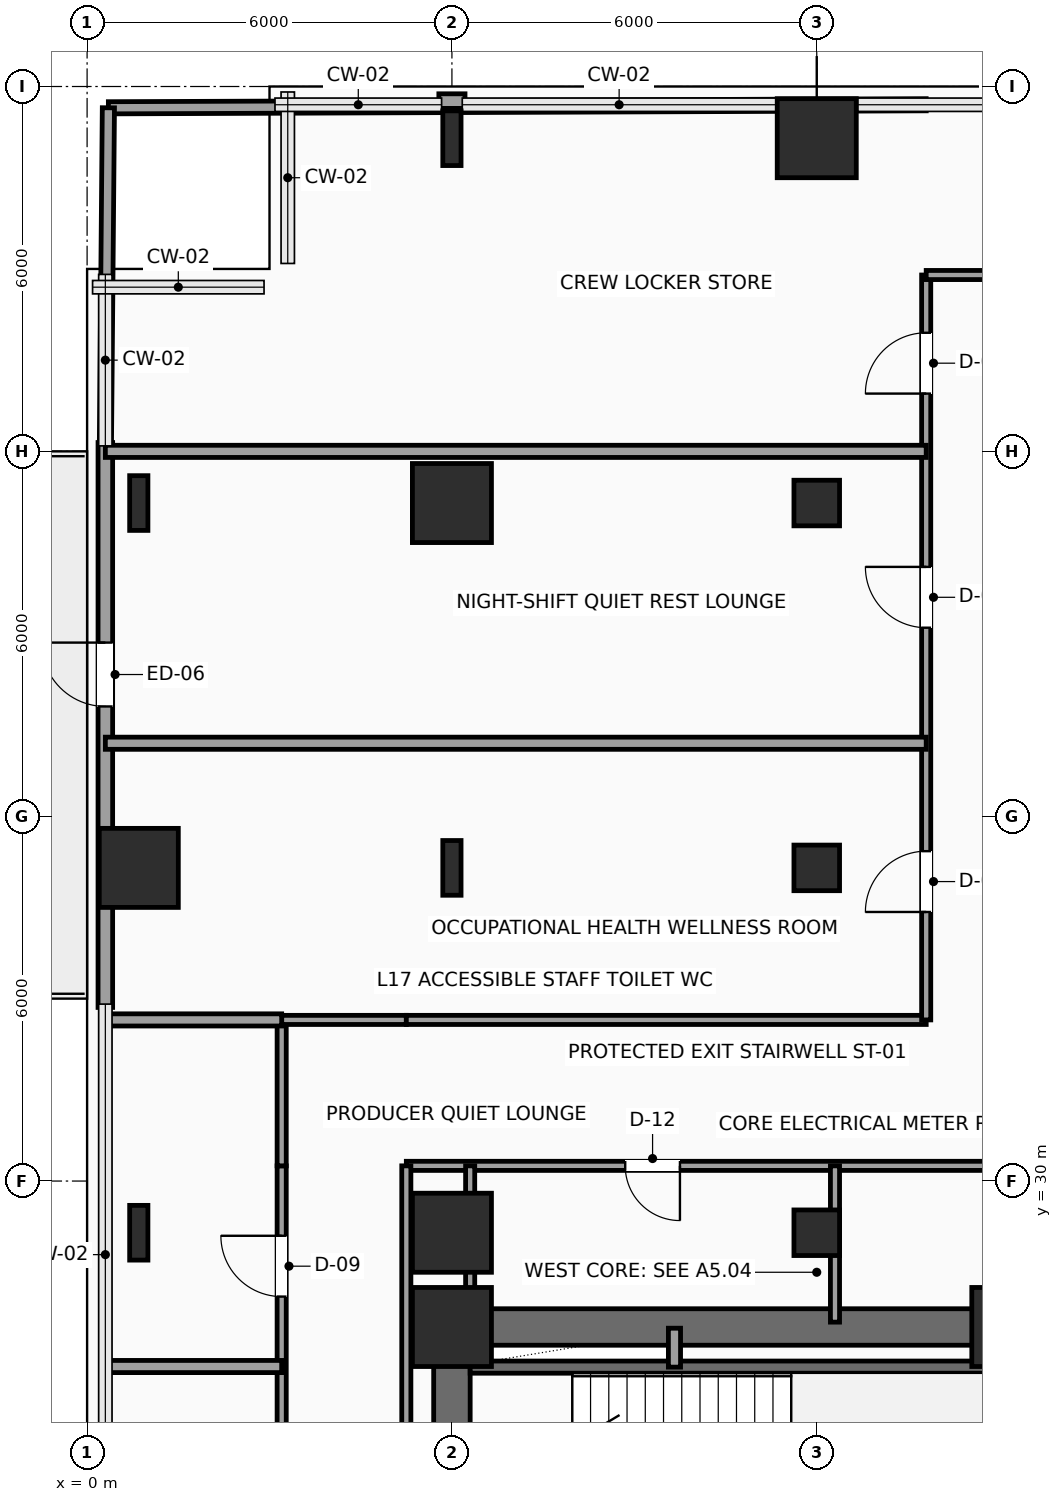
"""IFC4 building model, lengths in metres.
Left out: names, types, materials, properties, quantities, classifications, styles, units other than length and angle.
Written with IfcOpenShell. Run it as: python <this file> out.ifc"""

import sys

from ifc_helpers import new_model, si_unit, direction, frame, frame_2d, origin, origin_2d, place, context, subcontext, project, spatial, rectangle, hollow_rectangle, i_section, extrude, element, fill, save


model = new_model("IFC4")
c1 = context("Model", 3, precision=1e-05, world=origin(), true_north=direction((0.0, 1.0)))
c2 = subcontext(c1, "Body", "Model", "MODEL_VIEW")
j1 = project(units=[si_unit("LENGTHUNIT", "METRE"), si_unit("PLANEANGLEUNIT", "RADIAN")], contexts=[c1])
p1 = place(None, origin())
s1 = spatial("IfcSite", under=j1, at=p1, CompositionType="ELEMENT")
p2 = place(p1, origin())
s2 = spatial("IfcBuilding", under=s1, at=p2, CompositionType="ELEMENT")
p3 = place(p2, frame((0.0, 0.0, 75.3)))
s3 = spatial("IfcBuildingStorey", under=s2, at=p3, CompositionType="ELEMENT", Elevation=75.3)
for number, where, z_axis, x_axis in (
    (1, (6.0, 27.6, 0.0), (0.0, 0.0, 1.0), (1.0, 0.0, 0.0)),
    (2, (15.2, 27.6, 0.0), (0.0, 0.0, 1.0), (1.0, 0.0, 0.0)),
):
    element("IfcColumn", number, at=place(p3, frame(where, z_axis=z_axis, x_axis=x_axis)), inside=s3, PredefinedType="COLUMN", context=c2, shape_type="SweptSolid", body=[
        extrude(rectangle(XDim=1.3, YDim=1.3, at=origin_2d()), origin(), (0.0, 0.0, 1.0), 3.9),
    ])
p4 = place(p3, frame((0.85, 29.15, 0.0), z_axis=(0.0, 0.0, 1.0), x_axis=(1.0, 0.0, 0.0)))
e3 = element("IfcColumn", 3, at=p4, inside=s3, PredefinedType="COLUMN", context=c2, shape_type="SweptSolid", body=[
    extrude(i_section(OverallWidth=0.3, OverallDepth=0.9, WebThickness=0.019, FlangeThickness=0.035, FilletRadius=0.03, at=origin_2d()), origin(), (0.0, 0.0, 1.0), 3.9),
])
p5 = place(p3, frame((0.85, 35.15, 0.0), z_axis=(0.0, 0.0, 1.0), x_axis=(1.0, 0.0, 0.0)))
e4 = element("IfcColumn", 4, at=p5, inside=s3, PredefinedType="COLUMN", context=c2, shape_type="SweptSolid", body=[
    extrude(rectangle(XDim=1.3, YDim=1.3, at=origin_2d()), origin(), (0.0, 0.0, 1.0), 3.9),
])
p6 = place(p3, frame((0.85, 41.15, 0.0), z_axis=(0.0, 0.0, 1.0), x_axis=(1.0, 0.0, 0.0)))
e5 = element("IfcColumn", 5, at=p6, inside=s3, PredefinedType="COLUMN", context=c2, shape_type="SweptSolid", body=[
    extrude(i_section(OverallWidth=0.3, OverallDepth=0.9, WebThickness=0.019, FlangeThickness=0.035, FilletRadius=0.03, at=origin_2d()), origin(), (0.0, 0.0, 1.0), 3.9),
])
p7 = place(p3, frame((6.0, 29.15, 0.0), z_axis=(0.0, 0.0, 1.0), x_axis=(1.0, 0.0, 0.0)))
e6 = element("IfcColumn", 6, at=p7, inside=s3, PredefinedType="COLUMN", context=c2, shape_type="SweptSolid", body=[
    extrude(rectangle(XDim=1.3, YDim=1.3, at=origin_2d()), origin(), (0.0, 0.0, 1.0), 3.9),
])
p8 = place(p3, frame((6.0, 35.15, 0.0), z_axis=(0.0, 0.0, 1.0), x_axis=(1.0, 0.0, 0.0)))
e7 = element("IfcColumn", 7, at=p8, inside=s3, PredefinedType="COLUMN", context=c2, shape_type="SweptSolid", body=[
    extrude(i_section(OverallWidth=0.3, OverallDepth=0.9, WebThickness=0.019, FlangeThickness=0.035, FilletRadius=0.03, at=origin_2d()), origin(), (0.0, 0.0, 1.0), 3.9),
])
p9 = place(p3, frame((6.0, 41.15, 0.0), z_axis=(0.0, 0.0, 1.0), x_axis=(1.0, 0.0, 0.0)))
e8 = element("IfcColumn", 8, at=p9, inside=s3, PredefinedType="COLUMN", context=c2, shape_type="SweptSolid", body=[
    extrude(rectangle(XDim=1.3, YDim=1.3, at=origin_2d()), origin(), (0.0, 0.0, 1.0), 3.9),
])
p10 = place(p3, frame((6.0, 47.15, 0.0), z_axis=(0.0, 0.0, 1.0), x_axis=(1.0, 0.0, 0.0)))
e9 = element("IfcColumn", 9, at=p10, inside=s3, PredefinedType="COLUMN", context=c2, shape_type="SweptSolid", body=[
    extrude(i_section(OverallWidth=0.3, OverallDepth=0.9, WebThickness=0.019, FlangeThickness=0.035, FilletRadius=0.03, at=origin_2d()), origin(), (0.0, 0.0, 1.0), 3.9),
])
for number, where, z_axis, x_axis in (
    (10, (12.0, 29.15, 0.0), (0.0, 0.0, 1.0), (1.0, 0.0, 0.0)),
    (11, (12.0, 35.15, 0.0), (0.0, 0.0, 1.0), (1.0, 0.0, 0.0)),
    (12, (12.0, 41.15, 0.0), (0.0, 0.0, 1.0), (1.0, 0.0, 0.0)),
):
    element("IfcColumn", number, at=place(p3, frame(where, z_axis=z_axis, x_axis=x_axis)), inside=s3, PredefinedType="COLUMN", context=c2, shape_type="SweptSolid", body=[
        extrude(hollow_rectangle(XDim=0.75, YDim=0.75, WallThickness=0.035, InnerFilletRadius=0.035, OuterFilletRadius=0.05, at=origin_2d()), origin(), (0.0, 0.0, 1.0), 3.9),
    ])
p11 = place(p3, frame((12.0, 47.15, 0.0), z_axis=(0.0, 0.0, 1.0), x_axis=(1.0, 0.0, 0.0)))
e13 = element("IfcColumn", 13, at=p11, inside=s3, PredefinedType="COLUMN", context=c2, shape_type="SweptSolid", body=[
    extrude(rectangle(XDim=1.3, YDim=1.3, at=origin_2d()), origin(), (0.0, 0.0, 1.0), 3.9),
])
p12 = place(p3, frame((0.3, 32.855, 0.0), z_axis=(0.0, 0.0, 1.0), x_axis=(0.0, 1.0, 0.0)))
e14 = element("IfcWall", 14, at=p12, inside=s3, PredefinedType="SOLIDWALL", context=c2, shape_type="SweptSolid", body=[
    extrude(rectangle(XDim=9.29, YDim=0.24, at=frame_2d((4.645, 0.0))), origin(), (0.0, 0.0, 1.0), 3.65),
])
p13 = place(p12, frame((4.95, 0.0, 0.0)))
e15 = element("IfcOpeningElement", 15, at=p13, cuts=e14, PredefinedType="OPENING", context=c2, shape_type="SweptSolid", body=[
    extrude(rectangle(XDim=1.05, YDim=2.2, at=frame_2d((0.525, 1.1))), frame((0.0, 0.13, 0.0), z_axis=(0.0, -1.0, 0.0), x_axis=(1.0, 0.0, 0.0)), (0.0, 0.0, 1.0), 0.26),
])
p14 = place(p3, frame((5.785, 47.76, 0.0), z_axis=(0.0, 0.0, 1.0), x_axis=(1.0, 0.0, 0.0)))
e16 = element("IfcWall", 16, at=p14, inside=s3, PredefinedType="SOLIDWALL", context=c2, shape_type="SweptSolid", body=[
    extrude(rectangle(XDim=0.43, YDim=0.24, at=frame_2d((0.215, 0.0))), origin(), (0.0, 0.0, 1.0), 3.65),
])
p15 = place(p3, frame((6.0, 27.6, 0.0), z_axis=(0.0, 0.0, 1.0), x_axis=(1.0, 0.0, 0.0)))
e17 = element("IfcWall", 17, at=p15, inside=s3, PredefinedType="SHEAR", context=c2, shape_type="SweptSolid", body=[
    extrude(rectangle(XDim=12.0, YDim=0.6, at=frame_2d((6.0, 0.0))), origin(), (0.0, 0.0, 1.0), 3.65),
])
p16 = place(p15, frame((10.2, 0.0, 0.0)))
e18 = element("IfcOpeningElement", 18, at=p16, cuts=e17, PredefinedType="OPENING", context=c2, shape_type="SweptSolid", body=[
    extrude(rectangle(XDim=0.9, YDim=2.15, at=frame_2d((0.45, 1.075))), frame((0.0, 0.31, 0.0), z_axis=(0.0, -1.0, 0.0), x_axis=(1.0, 0.0, 0.0)), (0.0, 0.0, 1.0), 0.62),
])
p17 = place(p3, frame((6.0, 18.0, 0.0), z_axis=(0.0, 0.0, 1.0), x_axis=(0.0, 1.0, 0.0)))
e19 = element("IfcWall", 19, at=p17, inside=s3, PredefinedType="SHEAR", context=c2, shape_type="SweptSolid", body=[
    extrude(rectangle(XDim=9.6, YDim=0.6, at=frame_2d((4.8, 0.0))), origin(), (0.0, 0.0, 1.0), 3.65),
])
p18 = place(p3, frame((6.3, 26.94, 0.0), z_axis=(0.0, 0.0, 1.0), x_axis=(1.0, 0.0, 0.0)))
e20 = element("IfcWall", 20, at=p18, inside=s3, PredefinedType="SHEAR", context=c2, shape_type="SweptSolid", body=[
    extrude(rectangle(XDim=8.88, YDim=0.2, at=frame_2d((4.44, 0.0))), origin(), (0.0, 0.0, 1.0), 3.65),
])
p19 = place(p3, frame((9.66, 26.94, 0.0), z_axis=(0.0, 0.0, 1.0), x_axis=(0.0, 1.0, 0.0)))
e21 = element("IfcWall", 21, at=p19, inside=s3, PredefinedType="SOLIDWALL", context=c2, shape_type="SweptSolid", body=[
    extrude(rectangle(XDim=0.64, YDim=0.2, at=frame_2d((0.32, 0.0))), origin(), (0.0, 0.0, 1.0), 3.65),
])
p20 = place(p3, frame((3.2, 14.55, 0.0), z_axis=(0.0, 0.0, 1.0), x_axis=(0.0, 1.0, 0.0)))
e22 = element("IfcWall", 22, at=p20, inside=s3, PredefinedType="PARTITIONING", context=c2, shape_type="SweptSolid", body=[
    extrude(rectangle(XDim=15.7, YDim=0.15, at=frame_2d((7.85, 0.0))), origin(), (0.0, 0.0, 1.0), 3.65),
])
p21 = place(p20, frame((2.6, 0.0, 0.0)))
e23 = element("IfcOpeningElement", 23, at=p21, cuts=e22, PredefinedType="OPENING", context=c2, shape_type="SweptSolid", body=[
    extrude(rectangle(XDim=1.0, YDim=2.2, at=frame_2d((0.5, 1.1))), frame((0.0, 0.085, 0.0), z_axis=(0.0, -1.0, 0.0), x_axis=(1.0, 0.0, 0.0)), (0.0, 0.0, 1.0), 0.17),
])
p22 = place(p20, frame((8.8, 0.0, 0.0)))
e24 = element("IfcOpeningElement", 24, at=p22, cuts=e22, PredefinedType="OPENING", context=c2, shape_type="SweptSolid", body=[
    extrude(rectangle(XDim=1.0, YDim=2.2, at=frame_2d((0.5, 1.1))), frame((0.0, 0.085, 0.0), z_axis=(0.0, -1.0, 0.0), x_axis=(1.0, 0.0, 0.0)), (0.0, 0.0, 1.0), 0.17),
])
p23 = place(p20, frame((13.55, 0.0, 0.0)))
e25 = element("IfcOpeningElement", 25, at=p23, cuts=e22, PredefinedType="OPENING", context=c2, shape_type="SweptSolid", body=[
    extrude(rectangle(XDim=1.0, YDim=2.2, at=frame_2d((0.5, 1.1))), frame((0.0, 0.085, 0.0), z_axis=(0.0, -1.0, 0.0), x_axis=(1.0, 0.0, 0.0)), (0.0, 0.0, 1.0), 0.17),
])
p24 = place(p3, frame((3.2, 30.25, 0.0), z_axis=(0.0, 0.0, 1.0), x_axis=(0.0, 1.0, 0.0)))
e26 = element("IfcWall", 26, at=p24, inside=s3, PredefinedType="PARTITIONING", context=c2, shape_type="SweptSolid", body=[
    extrude(rectangle(XDim=2.4, YDim=0.15, at=frame_2d((1.2, 0.0))), origin(), (0.0, 0.0, 1.0), 3.65),
])
p25 = place(p3, frame((3.2, 32.65, 0.0), z_axis=(0.0, 0.0, 1.0), x_axis=(1.0, 0.0, 0.0)))
e27 = element("IfcWall", 27, at=p25, inside=s3, PredefinedType="PARTITIONING", context=c2, shape_type="SweptSolid", body=[
    extrude(rectangle(XDim=2.05, YDim=0.15, at=frame_2d((1.025, 0.0))), origin(), (0.0, 0.0, 1.0), 3.65),
])
p26 = place(p3, frame((5.25, 32.65, 0.0), z_axis=(0.0, 0.0, 1.0), x_axis=(1.0, 0.0, 0.0)))
e28 = element("IfcWall", 28, at=p26, inside=s3, PredefinedType="PARTITIONING", context=c2, shape_type="SweptSolid", body=[
    extrude(rectangle(XDim=8.55, YDim=0.15, at=frame_2d((4.275, 0.0))), origin(), (0.0, 0.0, 1.0), 3.65),
])
p27 = place(p3, frame((13.8, 32.65, 0.0), z_axis=(0.0, 0.0, 1.0), x_axis=(0.0, 1.0, 0.0)))
e29 = element("IfcWall", 29, at=p27, inside=s3, PredefinedType="PARTITIONING", context=c2, shape_type="SweptSolid", body=[
    extrude(rectangle(XDim=12.25, YDim=0.15, at=frame_2d((6.125, 0.0))), origin(), (0.0, 0.0, 1.0), 3.65),
])
p28 = place(p27, frame((1.775, 0.0, 0.0)))
e30 = element("IfcOpeningElement", 30, at=p28, cuts=e29, PredefinedType="OPENING", context=c2, shape_type="SweptSolid", body=[
    extrude(rectangle(XDim=1.0, YDim=2.2, at=frame_2d((0.5, 1.1))), frame((0.0, 0.085, 0.0), z_axis=(0.0, -1.0, 0.0), x_axis=(1.0, 0.0, 0.0)), (0.0, 0.0, 1.0), 0.17),
])
p29 = place(p27, frame((6.45, 0.0, 0.0)))
e31 = element("IfcOpeningElement", 31, at=p29, cuts=e29, PredefinedType="OPENING", context=c2, shape_type="SweptSolid", body=[
    extrude(rectangle(XDim=1.0, YDim=2.2, at=frame_2d((0.5, 1.1))), frame((0.0, 0.085, 0.0), z_axis=(0.0, -1.0, 0.0), x_axis=(1.0, 0.0, 0.0)), (0.0, 0.0, 1.0), 0.17),
])
p30 = place(p27, frame((10.3, 0.0, 0.0)))
e32 = element("IfcOpeningElement", 32, at=p30, cuts=e29, PredefinedType="OPENING", context=c2, shape_type="SweptSolid", body=[
    extrude(rectangle(XDim=1.0, YDim=2.2, at=frame_2d((0.5, 1.1))), frame((0.0, 0.085, 0.0), z_axis=(0.0, -1.0, 0.0), x_axis=(1.0, 0.0, 0.0)), (0.0, 0.0, 1.0), 0.17),
])
p31 = place(p3, frame((13.8, 44.9, 0.0), z_axis=(0.0, 0.0, 1.0), x_axis=(1.0, 0.0, 0.0)))
e33 = element("IfcWall", 33, at=p31, inside=s3, PredefinedType="PARTITIONING", context=c2, shape_type="SweptSolid", body=[
    extrude(rectangle(XDim=2.35, YDim=0.15, at=frame_2d((1.175, 0.0))), origin(), (0.0, 0.0, 1.0), 3.65),
])
p32 = place(p3, frame((15.88, 30.25, 0.0), z_axis=(0.0, 0.0, 1.0), x_axis=(-1.0, 0.0, 0.0)))
e34 = element("IfcWall", 34, at=p32, inside=s3, PredefinedType="PARTITIONING", context=c2, shape_type="SweptSolid", body=[
    extrude(rectangle(XDim=10.63, YDim=0.15, at=frame_2d((5.315, 0.0))), origin(), (0.0, 0.0, 1.0), 3.65),
])
p33 = place(p32, frame((6.13, 0.0, 0.0)))
e35 = element("IfcOpeningElement", 35, at=p33, cuts=e34, PredefinedType="OPENING", context=c2, shape_type="SweptSolid", body=[
    extrude(rectangle(XDim=0.9, YDim=2.1, at=frame_2d((0.45, 1.05))), frame((0.0, 0.085, 0.0), z_axis=(0.0, -1.0, 0.0), x_axis=(1.0, 0.0, 0.0)), (0.0, 0.0, 1.0), 0.17),
])
p34 = place(p3, frame((5.25, 30.25, 0.0), z_axis=(0.0, 0.0, 1.0), x_axis=(0.0, -1.0, 0.0)))
e36 = element("IfcWall", 36, at=p34, inside=s3, PredefinedType="PARTITIONING", context=c2, shape_type="SweptSolid", body=[
    extrude(rectangle(XDim=13.35, YDim=0.15, at=frame_2d((6.675, 0.0))), origin(), (0.0, 0.0, 1.0), 3.65),
])
for number, where, z_axis, x_axis in (
    (37, (6.3, 27.68, 0.0), (0.0, 0.0, 1.0), (0.0, 1.0, 0.0)),
    (38, (12.3, 27.68, 0.0), (0.0, 0.0, 1.0), (0.0, 1.0, 0.0)),
):
    element("IfcWall", number, at=place(p3, frame(where, z_axis=z_axis, x_axis=x_axis)), inside=s3, PredefinedType="PARTITIONING", context=c2, shape_type="SweptSolid", body=[
        extrude(rectangle(XDim=2.57, YDim=0.15, at=frame_2d((1.285, 0.0))), origin(), (0.0, 0.0, 1.0), 2.992),
    ])
for number, where, z_axis, x_axis in (
    (39, (0.3, 37.2, 0.0), (0.0, 0.0, 1.0), (1.0, 0.0, 0.0)),
    (40, (0.3, 42.0, 0.0), (0.0, 0.0, 1.0), (1.0, 0.0, 0.0)),
):
    element("IfcWall", number, at=place(p3, frame(where, z_axis=z_axis, x_axis=x_axis)), inside=s3, PredefinedType="PARTITIONING", context=c2, shape_type="SweptSolid", body=[
        extrude(rectangle(XDim=13.5, YDim=0.2, at=frame_2d((6.75, 0.0))), origin(), (0.0, 0.0, 1.0), 3.65),
    ])
p35 = place(p3, frame((0.35, 47.65, 0.0), z_axis=(0.0, 0.0, 1.0), x_axis=(0.99999304924, 0.003728467862, 0.0)))
e41 = element("IfcWall", 41, at=p35, inside=s3, PredefinedType="PARTITIONING", context=c2, shape_type="SweptSolid", body=[
    extrude(rectangle(XDim=5.435, YDim=0.2, at=frame_2d((2.717, 0.0))), origin(), (0.0, 0.0, 1.0), 3.65),
])
p36 = place(p3, frame((6.215, 47.672, 0.0), z_axis=(0.0, 0.0, 1.0), x_axis=(0.999993149305, 0.003701532515, 0.0)))
e42 = element("IfcWall", 42, at=p36, inside=s3, PredefinedType="PARTITIONING", context=c2, shape_type="SweptSolid", body=[
    extrude(rectangle(XDim=7.585, YDim=0.2, at=frame_2d((3.792, 0.0))), origin(), (0.0, 0.0, 1.0), 3.65),
])
p37 = place(p3, frame((0.301, 42.145, 0.0), z_axis=(0.0, 0.0, 1.0), x_axis=(0.008869617387, 0.99996066417, 0.0)))
e43 = element("IfcWall", 43, at=p37, inside=s3, PredefinedType="PARTITIONING", context=c2, shape_type="SweptSolid", body=[
    extrude(rectangle(XDim=5.505, YDim=0.2, at=frame_2d((2.752, 0.0))), origin(), (0.0, 0.0, 1.0), 3.65),
])
for number, where, z_axis, x_axis in (
    (44, (0.3, 26.95, 0.0), (0.0, 0.0, 1.0), (1.0, 0.0, 0.0)),
    (45, (0.3, 32.65, 0.0), (0.0, 0.0, 1.0), (1.0, 0.0, 0.0)),
):
    element("IfcWall", number, at=place(p3, frame(where, z_axis=z_axis, x_axis=x_axis)), inside=s3, PredefinedType="PARTITIONING", context=c2, shape_type="SweptSolid", body=[
        extrude(rectangle(XDim=2.9, YDim=0.2, at=frame_2d((1.45, 0.0))), origin(), (0.0, 0.0, 1.0), 3.65),
    ])
p38 = place(p13, origin())
e46 = element("IfcDoor", 46, at=p38, inside=s3, OperationType="SINGLE_SWING_RIGHT", PredefinedType="DOOR", context=c2, shape_type="SweptSolid", body=[
    extrude(rectangle(XDim=1.05, YDim=2.2, at=frame_2d((0.525, 1.1))), frame((0.0, 0.025, 0.0), z_axis=(0.0, -1.0, 0.0), x_axis=(1.0, 0.0, 0.0)), (0.0, 0.0, 1.0), 0.05),
])
fill(e15, e46)
p39 = place(p23, origin())
e47 = element("IfcDoor", 47, at=p39, inside=s3, OperationType="SINGLE_SWING_RIGHT", PredefinedType="DOOR", context=c2, shape_type="SweptSolid", body=[
    extrude(rectangle(XDim=1.0, YDim=2.2, at=frame_2d((0.5, 1.1))), frame((0.0, 0.025, 0.0), z_axis=(0.0, -1.0, 0.0), x_axis=(1.0, 0.0, 0.0)), (0.0, 0.0, 1.0), 0.05),
])
fill(e25, e47)
p40 = place(p28, origin())
e48 = element("IfcDoor", 48, at=p40, inside=s3, OperationType="SINGLE_SWING_LEFT", PredefinedType="DOOR", context=c2, shape_type="SweptSolid", body=[
    extrude(rectangle(XDim=1.0, YDim=2.2, at=frame_2d((0.5, 1.1))), frame((0.0, 0.025, 0.0), z_axis=(0.0, -1.0, 0.0), x_axis=(1.0, 0.0, 0.0)), (0.0, 0.0, 1.0), 0.05),
])
fill(e30, e48)
p41 = place(p29, origin())
e49 = element("IfcDoor", 49, at=p41, inside=s3, OperationType="SINGLE_SWING_RIGHT", PredefinedType="DOOR", context=c2, shape_type="SweptSolid", body=[
    extrude(rectangle(XDim=1.0, YDim=2.2, at=frame_2d((0.5, 1.1))), frame((0.0, 0.025, 0.0), z_axis=(0.0, -1.0, 0.0), x_axis=(1.0, 0.0, 0.0)), (0.0, 0.0, 1.0), 0.05),
])
fill(e31, e49)
p42 = place(p30, origin())
e50 = element("IfcDoor", 50, at=p42, inside=s3, OperationType="SINGLE_SWING_LEFT", PredefinedType="DOOR", context=c2, shape_type="SweptSolid", body=[
    extrude(rectangle(XDim=1.0, YDim=2.2, at=frame_2d((0.5, 1.1))), frame((0.0, 0.025, 0.0), z_axis=(0.0, -1.0, 0.0), x_axis=(1.0, 0.0, 0.0)), (0.0, 0.0, 1.0), 0.05),
])
fill(e32, e50)
p43 = place(p33, origin())
e51 = element("IfcDoor", 51, at=p43, inside=s3, OperationType="SINGLE_SWING_LEFT", PredefinedType="DOOR", context=c2, shape_type="SweptSolid", body=[
    extrude(rectangle(XDim=0.9, YDim=2.1, at=frame_2d((0.45, 1.05))), frame((0.0, 0.025, 0.0), z_axis=(0.0, -1.0, 0.0), x_axis=(1.0, 0.0, 0.0)), (0.0, 0.0, 1.0), 0.05),
])
fill(e35, e51)
save(model, sys.argv[1])
